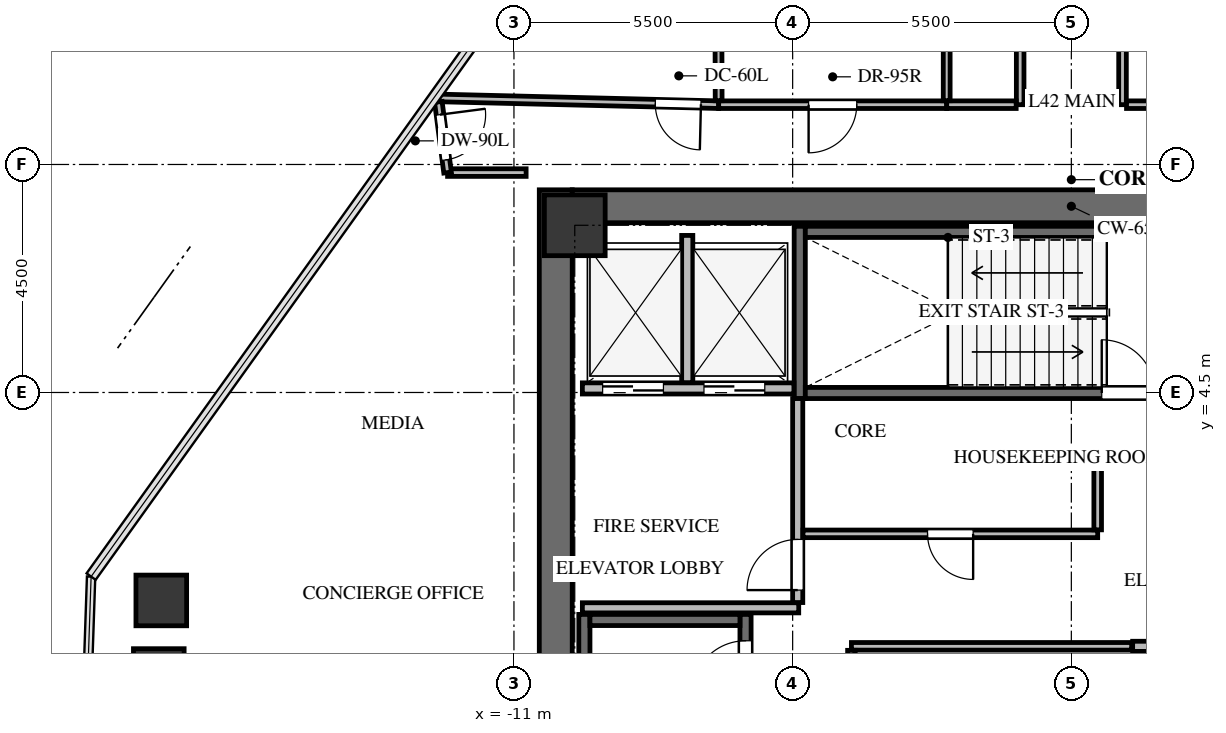
"""IFC4 building model, lengths in metres.
Left out: names, types, materials, properties, quantities, classifications, styles, units other than length and angle.
Written with IfcOpenShell. Run it as: python <this file> out.ifc"""

import sys

from ifc_helpers import new_model, si_unit, direction, frame, frame_2d, origin, origin_2d, place, context, subcontext, project, spatial, rectangle, extrude, source, transform, mapped, element, fill, save


model = new_model("IFC4")
c1 = context("Model", 3, precision=1e-05, world=origin(), true_north=direction((0.0, 1.0)))
c2 = subcontext(c1, "Body", "Model", "MODEL_VIEW")
j1 = project(units=[si_unit("LENGTHUNIT", "METRE"), si_unit("PLANEANGLEUNIT", "RADIAN")], contexts=[c1])
p1 = place(None, origin())
s1 = spatial("IfcSite", under=j1, at=p1, CompositionType="ELEMENT")
p2 = place(p1, origin())
s2 = spatial("IfcBuilding", under=s1, at=p2, CompositionType="ELEMENT")
p3 = place(p2, frame((0.0, 0.0, 155.1)))
s3 = spatial("IfcBuildingStorey", under=s2, at=p3, CompositionType="ELEMENT", Elevation=155.1)
p4 = place(p3, frame((-10.175, -8.5, 0.0), z_axis=(0.0, 0.0, 1.0), x_axis=(0.0, 1.0, 0.0)))
e1 = element("IfcWall", 1, at=p4, inside=s3, PredefinedType="SHEAR", context=c2, shape_type="SweptSolid", body=[
    extrude(rectangle(XDim=17.0, YDim=0.65, at=frame_2d((8.5, 0.0))), origin(), (0.0, 0.0, 1.0), 4.2),
])
p5 = place(p3, frame((-9.85, 8.175, 0.0), z_axis=(0.0, 0.0, 1.0), x_axis=(1.0, 0.0, 0.0)))
e2 = element("IfcWall", 2, at=p5, inside=s3, PredefinedType="SHEAR", context=c2, shape_type="SweptSolid", body=[
    extrude(rectangle(XDim=19.7, YDim=0.65, at=frame_2d((9.85, 0.0))), origin(), (0.0, 0.0, 1.0), 4.2),
])
p6 = place(p3, frame((-6.43, -7.77, -0.32), z_axis=(0.0, 0.0, 1.0), x_axis=(0.0, 1.0, 0.0)))
e3 = element("IfcWall", 3, at=p6, inside=s3, PredefinedType="SHEAR", context=c2, shape_type="SweptSolid", body=[
    extrude(rectangle(XDim=7.89, YDim=0.22, at=frame_2d((3.945, 0.0))), origin(), (0.0, 0.0, 1.0), 4.28),
])
p7 = place(p6, frame((6.32, 0.0, 0.0)))
e4 = element("IfcOpeningElement", 4, at=p7, cuts=e3, PredefinedType="OPENING", context=c2, shape_type="SweptSolid", body=[
    extrude(rectangle(XDim=1.05, YDim=2.15, at=frame_2d((0.525, 1.075))), frame((0.0, 0.12, 0.0), z_axis=(0.0, -1.0, 0.0), x_axis=(1.0, 0.0, 0.0)), (0.0, 0.0, 1.0), 0.24),
])
p8 = place(p3, frame((-9.61, 0.12, -0.32), z_axis=(0.0, 0.0, 1.0), x_axis=(0.0, -1.0, 0.0)))
e5 = element("IfcWall", 5, at=p8, inside=s3, PredefinedType="SHEAR", context=c2, shape_type="SweptSolid", body=[
    extrude(rectangle(XDim=7.89, YDim=0.22, at=frame_2d((3.945, 0.0))), origin(), (0.0, 0.0, 1.0), 4.28),
])
p9 = place(p3, frame((-6.54, 0.01, -0.32), z_axis=(0.0, 0.0, 1.0), x_axis=(-1.0, 0.0, 0.0)))
e6 = element("IfcWall", 6, at=p9, inside=s3, PredefinedType="SHEAR", context=c2, shape_type="SweptSolid", body=[
    extrude(rectangle(XDim=2.96, YDim=0.22, at=frame_2d((1.48, 0.0))), origin(), (0.0, 0.0, 1.0), 4.28),
])
p10 = place(p3, frame((-5.36, 7.78, -0.32), z_axis=(0.0, 0.0, 1.0), x_axis=(0.0, -1.0, 0.0)))
e7 = element("IfcWall", 7, at=p10, inside=s3, PredefinedType="SHEAR", context=c2, shape_type="SweptSolid", body=[
    extrude(rectangle(XDim=3.4, YDim=0.22, at=frame_2d((1.7, 0.0))), origin(), (0.0, 0.0, 1.0), 4.28),
])
p11 = place(p3, frame((-5.25, 4.49, -0.32), z_axis=(0.0, 0.0, 1.0), x_axis=(1.0, 0.0, 0.0)))
e8 = element("IfcWall", 8, at=p11, inside=s3, PredefinedType="SHEAR", context=c2, shape_type="SweptSolid", body=[
    extrude(rectangle(XDim=7.35, YDim=0.22, at=frame_2d((3.675, 0.0))), origin(), (0.0, 0.0, 1.0), 4.28),
])
p12 = place(p11, frame((5.85, 0.0, 0.0)))
e9 = element("IfcOpeningElement", 9, at=p12, cuts=e8, PredefinedType="OPENING", context=c2, shape_type="SweptSolid", body=[
    extrude(rectangle(XDim=1.05, YDim=2.15, at=frame_2d((0.525, 1.075))), frame((0.0, 0.12, 0.0), z_axis=(0.0, -1.0, 0.0), x_axis=(1.0, 0.0, 0.0)), (0.0, 0.0, 1.0), 0.24),
])
p13 = place(p3, frame((2.1, 7.67, -0.32), z_axis=(0.0, 0.0, 1.0), x_axis=(-1.0, 0.0, 0.0)))
e10 = element("IfcWall", 10, at=p13, inside=s3, PredefinedType="SHEAR", context=c2, shape_type="SweptSolid", body=[
    extrude(rectangle(XDim=7.35, YDim=0.22, at=frame_2d((3.675, 0.0))), origin(), (0.0, 0.0, 1.0), 4.28),
])
m1 = source(origin(), c2, "Body", "SweptSolid", [
    extrude(rectangle(XDim=1.2, YDim=1.2, at=origin_2d()), origin(), (0.0, 0.0, 1.0), 4.28),
])
p14 = place(p3, frame((-9.8, 7.8, -0.32), z_axis=(0.0, 0.0, 1.0), x_axis=(1.0, 0.0, 0.0)))
e11 = element("IfcColumn", 11, at=p14, inside=s3, PredefinedType="COLUMN", context=c2, shape_type="MappedRepresentation", body=[
    mapped(m1, transform((0.0, 0.0, 0.0), x_axis=(1.0, 0.0, 0.0), y_axis=(0.0, 1.0, 0.0), z_axis=(0.0, 0.0, 1.0), scale=1.0)),
])
m2 = source(origin(), c2, "Body", "SweptSolid", [
    extrude(rectangle(XDim=1.0, YDim=1.0, at=origin_2d()), origin(), (0.0, 0.0, 1.0), 4.28),
])
for number, where, z_axis, x_axis in (
    (12, (-18.009, -1.057, -0.32), (0.0, 0.0, 1.0), (1.0, 0.0, 0.0)),
    (13, (-17.96, 0.396, -0.32), (0.0, 0.0, 1.0), (1.0, 0.0, 0.0)),
):
    element("IfcColumn", number, at=place(p3, frame(where, z_axis=z_axis, x_axis=x_axis)), inside=s3, PredefinedType="COLUMN", context=c2, shape_type="MappedRepresentation", body=[
        mapped(m2, transform((0.0, 0.0, 0.0), x_axis=(1.0, 0.0, 0.0), y_axis=(0.0, 1.0, 0.0), z_axis=(0.0, 0.0, 1.0), scale=1.0)),
    ])
p15 = place(p3, frame((-9.65, 4.58, 0.0), z_axis=(0.0, 0.0, 1.0), x_axis=(1.0, 0.0, 0.0)))
e14 = element("IfcWall", 14, at=p15, inside=s3, PredefinedType="SOLIDWALL", context=c2, shape_type="SweptSolid", body=[
    extrude(rectangle(XDim=4.175, YDim=0.22, at=frame_2d((2.087, 0.0))), origin(), (0.0, 0.0, 1.0), 3.945),
])
p16 = place(p15, frame((0.4, 0.0, 0.0)))
e15 = element("IfcOpeningElement", 15, at=p16, cuts=e14, PredefinedType="OPENING", context=c2, shape_type="SweptSolid", body=[
    extrude(rectangle(XDim=1.2, YDim=2.15, at=frame_2d((0.6, 1.075))), frame((0.0, 0.12, 0.0), z_axis=(0.0, -1.0, 0.0), x_axis=(1.0, 0.0, 0.0)), (0.0, 0.0, 1.0), 0.24),
])
p17 = place(p15, frame((2.4, 0.0, 0.0)))
e16 = element("IfcOpeningElement", 16, at=p17, cuts=e14, PredefinedType="OPENING", context=c2, shape_type="SweptSolid", body=[
    extrude(rectangle(XDim=1.2, YDim=2.15, at=frame_2d((0.6, 1.075))), frame((0.0, 0.12, 0.0), z_axis=(0.0, -1.0, 0.0), x_axis=(1.0, 0.0, 0.0)), (0.0, 0.0, 1.0), 0.24),
])
p18 = place(p3, frame((-7.58, 4.694, 0.0), z_axis=(0.0, 0.0, 1.0), x_axis=(0.0, 1.0, 0.0)))
e17 = element("IfcWall", 17, at=p18, inside=s3, PredefinedType="SOLIDWALL", context=c2, shape_type="SweptSolid", body=[
    extrude(rectangle(XDim=2.906, YDim=0.22, at=frame_2d((1.453, 0.0))), origin(), (0.0, 0.0, 1.0), 3.945),
])
p19 = place(p3, frame((-9.65, 0.25, 0.0), z_axis=(0.0, 0.0, 1.0), x_axis=(1.0, 0.0, 0.0)))
e18 = element("IfcWall", 18, at=p19, inside=s3, PredefinedType="SOLIDWALL", context=c2, shape_type="SweptSolid", body=[
    extrude(rectangle(XDim=4.27, YDim=0.2, at=frame_2d((2.135, 0.0))), origin(), (0.0, 0.0, 1.0), 3.945),
])
p20 = place(p3, frame((-5.4, 0.354, 0.0), z_axis=(0.0, 0.0, 1.0), x_axis=(0.0, 1.0, 0.0)))
e19 = element("IfcWall", 19, at=p20, inside=s3, PredefinedType="SOLIDWALL", context=c2, shape_type="SweptSolid", body=[
    extrude(rectangle(XDim=4.026, YDim=0.2, at=frame_2d((2.013, 0.0))), origin(), (0.0, 0.0, 1.0), 3.945),
])
p21 = place(p20, frame((0.246, 0.0, 0.0)))
e20 = element("IfcOpeningElement", 20, at=p21, cuts=e19, PredefinedType="OPENING", context=c2, shape_type="SweptSolid", body=[
    extrude(rectangle(XDim=1.0, YDim=2.15, at=frame_2d((0.5, 1.075))), frame((0.0, 0.11, 0.0), z_axis=(0.0, -1.0, 0.0), x_axis=(1.0, 0.0, 0.0)), (0.0, 0.0, 1.0), 0.22),
])
p22 = place(p3, frame((-4.34, -0.51, 0.0), z_axis=(0.0, 0.0, 1.0), x_axis=(1.0, 0.0, 0.0)))
e21 = element("IfcWall", 21, at=p22, inside=s3, PredefinedType="PARTITIONING", context=c2, shape_type="SweptSolid", body=[
    extrude(rectangle(XDim=5.53, YDim=0.15, at=frame_2d((2.765, 0.0))), origin(), (0.0, 0.0, 1.0), 3.945),
])
p23 = place(p3, frame((-4.34, -2.961, 0.0), z_axis=(0.0, 0.0, 1.0), x_axis=(0.0, 1.0, 0.0)))
e22 = element("IfcWall", 22, at=p23, inside=s3, PredefinedType="PARTITIONING", context=c2, shape_type="SweptSolid", body=[
    extrude(rectangle(XDim=2.372, YDim=0.15, at=frame_2d((1.186, 0.0))), origin(), (0.0, 0.0, 1.0), 3.945),
])
p24 = place(p3, frame((1.21, -0.51, 0.0), z_axis=(0.0, 0.0, 1.0), x_axis=(1.0, 0.0, 0.0)))
e23 = element("IfcWall", 23, at=p24, inside=s3, PredefinedType="SOLIDWALL", context=c2, shape_type="SweptSolid", body=[
    extrude(rectangle(XDim=1.826, YDim=0.2, at=frame_2d((0.913, 0.0))), origin(), (0.0, 0.0, 1.0), 3.945),
])
p25 = place(p3, frame((0.52, 1.71, 0.0), z_axis=(0.0, 0.0, 1.0), x_axis=(-1.0, 0.0, 0.0)))
e24 = element("IfcWall", 24, at=p25, inside=s3, PredefinedType="PARTITIONING", context=c2, shape_type="SweptSolid", body=[
    extrude(rectangle(XDim=5.816, YDim=0.15, at=frame_2d((2.908, 0.0))), origin(), (0.0, 0.0, 1.0), 3.945),
])
p26 = place(p25, frame((2.458, 0.0, 0.0)))
e25 = element("IfcOpeningElement", 25, at=p26, cuts=e24, PredefinedType="OPENING", context=c2, shape_type="SweptSolid", body=[
    extrude(rectangle(XDim=0.9, YDim=2.05, at=frame_2d((0.45, 1.025))), frame((0.0, 0.085, 0.0), z_axis=(0.0, -1.0, 0.0), x_axis=(1.0, 0.0, 0.0)), (0.0, 0.0, 1.0), 0.17),
])
p27 = place(p3, frame((0.52, 3.3, 0.0), z_axis=(0.0, 0.0, 1.0), x_axis=(0.0, -1.0, 0.0)))
e26 = element("IfcWall", 26, at=p27, inside=s3, PredefinedType="PARTITIONING", context=c2, shape_type="SweptSolid", body=[
    extrude(rectangle(XDim=1.511, YDim=0.15, at=frame_2d((0.755, 0.0))), origin(), (0.0, 0.0, 1.0), 3.945),
])
p28 = place(p3, frame((-6.96, 10.18, 0.0), z_axis=(0.0, 0.0, 1.0), x_axis=(-0.999708370039, 0.024149013935, 0.0)))
e27 = element("IfcWall", 27, at=p28, inside=s3, PredefinedType="PARTITIONING", context=c2, shape_type="SweptSolid", body=[
    extrude(rectangle(XDim=5.621, YDim=0.15, at=frame_2d((2.811, 0.0))), origin(), (0.0, 0.0, 1.0), 3.142),
])
p29 = place(p28, frame((0.35, 0.0, 0.0)))
e28 = element("IfcOpeningElement", 28, at=p29, cuts=e27, PredefinedType="OPENING", context=c2, shape_type="SweptSolid", body=[
    extrude(rectangle(XDim=0.9, YDim=2.05, at=frame_2d((0.45, 1.025))), frame((0.0, 0.085, 0.0), z_axis=(0.0, -1.0, 0.0), x_axis=(1.0, 0.0, 0.0)), (0.0, 0.0, 1.0), 0.17),
])
p30 = place(p3, frame((-2.46, 10.18, 0.0), z_axis=(0.0, 0.0, 1.0), x_axis=(-1.0, 0.0, 0.0)))
e29 = element("IfcWall", 29, at=p30, inside=s3, PredefinedType="PARTITIONING", context=c2, shape_type="SweptSolid", body=[
    extrude(rectangle(XDim=4.5, YDim=0.15, at=frame_2d((2.25, 0.0))), origin(), (0.0, 0.0, 1.0), 3.142),
])
p31 = place(p30, frame((1.775, 0.0, 0.0)))
e30 = element("IfcOpeningElement", 30, at=p31, cuts=e29, PredefinedType="OPENING", context=c2, shape_type="SweptSolid", body=[
    extrude(rectangle(XDim=0.95, YDim=2.1, at=frame_2d((0.475, 1.05))), frame((0.0, 0.085, 0.0), z_axis=(0.0, -1.0, 0.0), x_axis=(1.0, 0.0, 0.0)), (0.0, 0.0, 1.0), 0.17),
])
p32 = place(p3, frame((-1.01, 16.283, 0.0), z_axis=(0.0, 0.0, 1.0), x_axis=(0.0, -1.0, 0.0)))
e31 = element("IfcWall", 31, at=p32, inside=s3, PredefinedType="PARTITIONING", context=c2, shape_type="SweptSolid", body=[
    extrude(rectangle(XDim=6.103, YDim=0.15, at=frame_2d((3.052, 0.0))), origin(), (0.0, 0.0, 1.0), 3.299),
])
p33 = place(p32, frame((2.592, 0.0, 0.0)))
e32 = element("IfcOpeningElement", 32, at=p33, cuts=e31, PredefinedType="OPENING", context=c2, shape_type="SweptSolid", body=[
    extrude(rectangle(XDim=0.92, YDim=2.1, at=frame_2d((0.46, 1.05))), frame((0.0, 0.085, 0.0), z_axis=(0.0, -1.0, 0.0), x_axis=(1.0, 0.0, 0.0)), (0.0, 0.0, 1.0), 0.17),
])
p34 = place(p3, frame((-1.089, 10.18, 0.0), z_axis=(0.0, 0.0, 1.0), x_axis=(-1.0, 0.0, 0.0)))
e33 = element("IfcWall", 33, at=p34, inside=s3, PredefinedType="PARTITIONING", context=c2, shape_type="SweptSolid", body=[
    extrude(rectangle(XDim=1.371, YDim=0.15, at=frame_2d((0.686, 0.0))), origin(), (0.0, 0.0, 1.0), 3.508),
])
p35 = place(p3, frame((1.01, 10.18, 0.0), z_axis=(0.0, 0.0, 1.0), x_axis=(0.0, 1.0, 0.0)))
e34 = element("IfcWall", 34, at=p35, inside=s3, PredefinedType="PARTITIONING", context=c2, shape_type="SweptSolid", body=[
    extrude(rectangle(XDim=6.103, YDim=0.15, at=frame_2d((3.052, 0.0))), origin(), (0.0, 0.0, 1.0), 3.299),
])
p36 = place(p35, frame((2.251, 0.0, 0.0)))
e35 = element("IfcOpeningElement", 35, at=p36, cuts=e34, PredefinedType="OPENING", context=c2, shape_type="SweptSolid", body=[
    extrude(rectangle(XDim=1.6, YDim=2.15, at=frame_2d((0.8, 1.075))), frame((0.0, 0.085, 0.0), z_axis=(0.0, -1.0, 0.0), x_axis=(1.0, 0.0, 0.0)), (0.0, 0.0, 1.0), 0.17),
])
p37 = place(p3, frame((4.54, 10.18, 0.0), z_axis=(0.0, 0.0, 1.0), x_axis=(-1.0, 0.0, 0.0)))
e36 = element("IfcWall", 36, at=p37, inside=s3, PredefinedType="PARTITIONING", context=c2, shape_type="SweptSolid", body=[
    extrude(rectangle(XDim=3.451, YDim=0.15, at=frame_2d((1.726, 0.0))), origin(), (0.0, 0.0, 1.0), 3.508),
])
p38 = place(p3, frame((-12.31, 8.84, 0.0), z_axis=(0.0, 0.0, 1.0), x_axis=(1.0, 0.0, 0.0)))
e37 = element("IfcWall", 37, at=p38, inside=s3, PredefinedType="PARTITIONING", context=c2, shape_type="SweptSolid", body=[
    extrude(rectangle(XDim=1.55, YDim=0.15, at=frame_2d((0.775, 0.0))), origin(), (0.0, 0.0, 1.0), 3.299),
])
p39 = place(p3, frame((-12.492, 10.235, 0.0), z_axis=(0.0, 0.0, 1.0), x_axis=(0.129331762516, -0.991601379186, 0.0)))
e38 = element("IfcWall", 38, at=p39, inside=s3, PredefinedType="PARTITIONING", context=c2, shape_type="SweptSolid", body=[
    extrude(rectangle(XDim=1.406, YDim=0.15, at=frame_2d((0.703, 0.0))), origin(), (0.0, 0.0, 1.0), 3.945),
])
p40 = place(p39, frame((0.253, 0.0, 0.0)))
e39 = element("IfcOpeningElement", 39, at=p40, cuts=e38, PredefinedType="OPENING", context=c2, shape_type="SweptSolid", body=[
    extrude(rectangle(XDim=0.9, YDim=2.05, at=frame_2d((0.45, 1.025))), frame((0.0, 0.085, 0.0), z_axis=(0.0, -1.0, 0.0), x_axis=(1.0, 0.0, 0.0)), (0.0, 0.0, 1.0), 0.17),
])
p41 = place(p3, frame((-6.978, 16.387, 0.0), z_axis=(0.0, 0.0, 1.0), x_axis=(0.00294831182, -0.999995653719, 0.0)))
e40 = element("IfcWall", 40, at=p41, inside=s3, PredefinedType="PARTITIONING", context=c2, shape_type="SweptSolid", body=[
    extrude(rectangle(XDim=6.128, YDim=0.135, at=frame_2d((3.064, 0.0))), origin(), (0.0, 0.0, 1.0), 3.142),
])
p42 = place(p3, frame((-2.46, 16.283, 0.0), z_axis=(0.0, 0.0, 1.0), x_axis=(0.0, -1.0, 0.0)))
e41 = element("IfcWall", 41, at=p42, inside=s3, PredefinedType="PARTITIONING", context=c2, shape_type="SweptSolid", body=[
    extrude(rectangle(XDim=6.024, YDim=0.135, at=frame_2d((3.012, 0.0))), origin(), (0.0, 0.0, 1.0), 3.299),
])
m3 = source(origin(), c2, "Body", "SweptSolid", [
    extrude(rectangle(XDim=1.05, YDim=2.15, at=frame_2d((0.525, 1.075))), frame((0.0, 0.025, 0.0), z_axis=(0.0, -1.0, 0.0), x_axis=(1.0, 0.0, 0.0)), (0.0, 0.0, 1.0), 0.05),
])
p43 = place(p7, origin())
e42 = element("IfcDoor", 42, at=p43, inside=s3, OperationType="SINGLE_SWING_LEFT", PredefinedType="DOOR", context=c2, shape_type="MappedRepresentation", body=[
    mapped(m3, transform((0.0, 0.0, 0.0), x_axis=(1.0, 0.0, 0.0), y_axis=(0.0, 1.0, 0.0), z_axis=(0.0, 0.0, 1.0), scale=1.0)),
])
fill(e4, e42)
p44 = place(p12, origin())
e43 = element("IfcDoor", 43, at=p44, inside=s3, OperationType="SINGLE_SWING_LEFT", PredefinedType="DOOR", context=c2, shape_type="MappedRepresentation", body=[
    mapped(m3, transform((0.0, 0.0, 0.0), x_axis=(1.0, 0.0, 0.0), y_axis=(0.0, 1.0, 0.0), z_axis=(0.0, 0.0, 1.0), scale=1.0)),
])
fill(e9, e43)
m4 = source(origin(), c2, "Body", "SweptSolid", [
    extrude(rectangle(XDim=1.2, YDim=2.15, at=frame_2d((0.6, 1.075))), frame((0.0, 0.025, 0.0), z_axis=(0.0, -1.0, 0.0), x_axis=(1.0, 0.0, 0.0)), (0.0, 0.0, 1.0), 0.05),
])
p45 = place(p16, origin())
e44 = element("IfcDoor", 44, at=p45, inside=s3, OperationType="DOUBLE_DOOR_SLIDING", PredefinedType="DOOR", context=c2, shape_type="MappedRepresentation", body=[
    mapped(m4, transform((0.0, 0.0, 0.0), x_axis=(1.0, 0.0, 0.0), y_axis=(0.0, 1.0, 0.0), z_axis=(0.0, 0.0, 1.0), scale=1.0)),
])
fill(e15, e44)
p46 = place(p17, origin())
e45 = element("IfcDoor", 45, at=p46, inside=s3, OperationType="DOUBLE_DOOR_SLIDING", PredefinedType="DOOR", context=c2, shape_type="MappedRepresentation", body=[
    mapped(m4, transform((0.0, 0.0, 0.0), x_axis=(1.0, 0.0, 0.0), y_axis=(0.0, 1.0, 0.0), z_axis=(0.0, 0.0, 1.0), scale=1.0)),
])
fill(e16, e45)
m5 = source(origin(), c2, "Body", "SweptSolid", [
    extrude(rectangle(XDim=1.0, YDim=2.15, at=frame_2d((0.5, 1.075))), frame((0.0, 0.025, 0.0), z_axis=(0.0, -1.0, 0.0), x_axis=(1.0, 0.0, 0.0)), (0.0, 0.0, 1.0), 0.05),
])
p47 = place(p21, origin())
e46 = element("IfcDoor", 46, at=p47, inside=s3, OperationType="SINGLE_SWING_LEFT", PredefinedType="DOOR", context=c2, shape_type="MappedRepresentation", body=[
    mapped(m5, transform((0.0, 0.0, 0.0), x_axis=(1.0, 0.0, 0.0), y_axis=(0.0, 1.0, 0.0), z_axis=(0.0, 0.0, 1.0), scale=1.0)),
])
fill(e20, e46)
m6 = source(origin(), c2, "Body", "SweptSolid", [
    extrude(rectangle(XDim=0.9, YDim=2.05, at=frame_2d((0.45, 1.025))), frame((0.0, 0.025, 0.0), z_axis=(0.0, -1.0, 0.0), x_axis=(1.0, 0.0, 0.0)), (0.0, 0.0, 1.0), 0.05),
])
p48 = place(p26, origin())
e47 = element("IfcDoor", 47, at=p48, inside=s3, OperationType="SINGLE_SWING_LEFT", PredefinedType="DOOR", context=c2, shape_type="MappedRepresentation", body=[
    mapped(m6, transform((0.0, 0.0, 0.0), x_axis=(1.0, 0.0, 0.0), y_axis=(0.0, 1.0, 0.0), z_axis=(0.0, 0.0, 1.0), scale=1.0)),
])
fill(e25, e47)
p49 = place(p29, origin())
e48 = element("IfcDoor", 48, at=p49, inside=s3, OperationType="SINGLE_SWING_LEFT", PredefinedType="DOOR", context=c2, shape_type="MappedRepresentation", body=[
    mapped(m6, transform((0.0, 0.0, 0.0), x_axis=(1.0, 0.0, 0.0), y_axis=(0.0, 1.0, 0.0), z_axis=(0.0, 0.0, 1.0), scale=1.0)),
])
fill(e28, e48)
m7 = source(origin(), c2, "Body", "SweptSolid", [
    extrude(rectangle(XDim=0.95, YDim=2.1, at=frame_2d((0.475, 1.05))), frame((0.0, 0.025, 0.0), z_axis=(0.0, -1.0, 0.0), x_axis=(1.0, 0.0, 0.0)), (0.0, 0.0, 1.0), 0.05),
])
p50 = place(p31, origin())
e49 = element("IfcDoor", 49, at=p50, inside=s3, OperationType="SINGLE_SWING_RIGHT", PredefinedType="DOOR", context=c2, shape_type="MappedRepresentation", body=[
    mapped(m7, transform((0.0, 0.0, 0.0), x_axis=(1.0, 0.0, 0.0), y_axis=(0.0, 1.0, 0.0), z_axis=(0.0, 0.0, 1.0), scale=1.0)),
])
fill(e30, e49)
m8 = source(origin(), c2, "Body", "SweptSolid", [
    extrude(rectangle(XDim=0.9, YDim=2.05, at=frame_2d((0.45, 1.025))), frame((0.0, 0.025, 0.0), z_axis=(0.0, -1.0, 0.0), x_axis=(1.0, 0.0, 0.0)), (0.0, 0.0, 1.0), 0.05),
])
p51 = place(p40, origin())
e50 = element("IfcDoor", 50, at=p51, inside=s3, OperationType="SINGLE_SWING_LEFT", PredefinedType="DOOR", context=c2, shape_type="MappedRepresentation", body=[
    mapped(m8, transform((0.0, 0.0, 0.0), x_axis=(1.0, 0.0, 0.0), y_axis=(0.0, 1.0, 0.0), z_axis=(0.0, 0.0, 1.0), scale=1.0)),
])
fill(e39, e50)
save(model, sys.argv[1])
